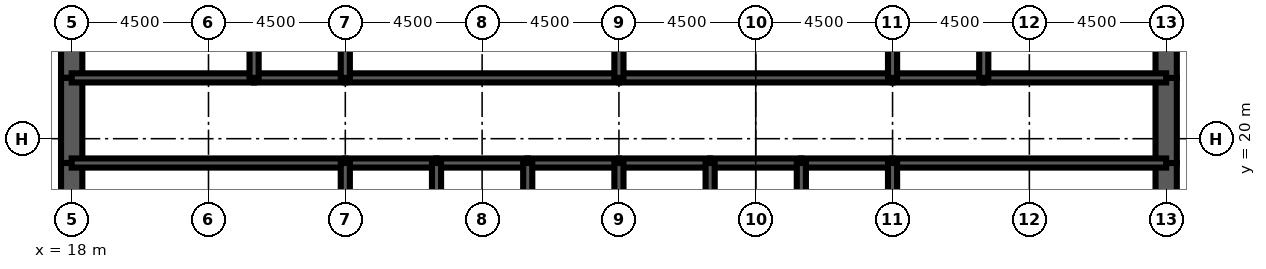
"""IFC4 building model, lengths in metres.
Left out: names, types, materials, properties, quantities, classifications, styles, units other than length and angle.
Written with IfcOpenShell. Run it as: python <this file> out.ifc"""

import sys

from ifc_helpers import new_model, si_unit, direction, frame, frame_2d, origin, place, context, subcontext, project, spatial, rectangle, extrude, element, fill, save


model = new_model("IFC4")
c1 = context("Model", 3, precision=1e-05, world=origin(), true_north=direction((0.0, 1.0)))
c2 = subcontext(c1, "Body", "Model", "MODEL_VIEW")
j1 = project(units=[si_unit("LENGTHUNIT", "METRE"), si_unit("PLANEANGLEUNIT", "RADIAN")], contexts=[c1])
p1 = place(None, origin())
s1 = spatial("IfcSite", under=j1, at=p1, CompositionType="ELEMENT")
p2 = place(p1, origin())
s2 = spatial("IfcBuilding", under=s1, at=p2, CompositionType="ELEMENT")
p3 = place(p2, frame((0.0, 0.0, 308.9)))
s3 = spatial("IfcBuildingStorey", under=s2, at=p3, CompositionType="ELEMENT", Elevation=308.9)
p4 = place(p3, frame((18.0, 26.0, 0.0), z_axis=(0.0, 0.0, 1.0), x_axis=(0.0, -1.0, 0.0)))
e1 = element("IfcWall", 1, at=p4, inside=s3, PredefinedType="SHEAR", context=c2, shape_type="SweptSolid", body=[
    extrude(rectangle(XDim=4.0, YDim=0.7, at=frame_2d((2.0, 0.0))), origin(), (0.0, 0.0, 1.0), 4.2),
])
p5 = place(p3, frame((18.0, 22.0, 0.0), z_axis=(0.0, 0.0, 1.0), x_axis=(0.0, -1.0, 0.0)))
e2 = element("IfcWall", 2, at=p5, inside=s3, PredefinedType="SHEAR", context=c2, shape_type="SweptSolid", body=[
    extrude(rectangle(XDim=2.8, YDim=0.7, at=frame_2d((1.4, 0.0))), origin(), (0.0, 0.0, 1.0), 4.2),
])
p6 = place(p5, frame((0.6, 0.0, 0.0)))
e3 = element("IfcOpeningElement", 3, at=p6, cuts=e2, PredefinedType="OPENING", context=c2, shape_type="SweptSolid", body=[
    extrude(rectangle(XDim=1.8, YDim=2.1, at=frame_2d((0.9, 1.05))), frame((0.0, 0.36, 0.0), z_axis=(0.0, -1.0, 0.0), x_axis=(1.0, 0.0, 0.0)), (0.0, 0.0, 1.0), 0.72),
])
for number, where, z_axis, x_axis in (
    (4, (18.0, 19.2, 0.0), (0.0, 0.0, 1.0), (0.0, -1.0, 0.0)),
    (5, (54.0, 16.0, 0.0), (0.0, 0.0, 1.0), (0.0, 1.0, 0.0)),
):
    element("IfcWall", number, at=place(p3, frame(where, z_axis=z_axis, x_axis=x_axis)), inside=s3, PredefinedType="SHEAR", context=c2, shape_type="SweptSolid", body=[
        extrude(rectangle(XDim=3.2, YDim=0.7, at=frame_2d((1.6, 0.0))), origin(), (0.0, 0.0, 1.0), 4.2),
    ])
p7 = place(p3, frame((54.0, 19.2, 0.0), z_axis=(0.0, 0.0, 1.0), x_axis=(0.0, 1.0, 0.0)))
e6 = element("IfcWall", 6, at=p7, inside=s3, PredefinedType="SHEAR", context=c2, shape_type="SweptSolid", body=[
    extrude(rectangle(XDim=2.8, YDim=0.7, at=frame_2d((1.4, 0.0))), origin(), (0.0, 0.0, 1.0), 4.2),
])
p8 = place(p7, frame((0.4, 0.0, 0.0)))
e7 = element("IfcOpeningElement", 7, at=p8, cuts=e6, PredefinedType="OPENING", context=c2, shape_type="SweptSolid", body=[
    extrude(rectangle(XDim=1.8, YDim=2.1, at=frame_2d((0.9, 1.05))), frame((0.0, 0.36, 0.0), z_axis=(0.0, -1.0, 0.0), x_axis=(1.0, 0.0, 0.0)), (0.0, 0.0, 1.0), 0.72),
])
p9 = place(p3, frame((54.0, 22.0, 0.0), z_axis=(0.0, 0.0, 1.0), x_axis=(0.0, 1.0, 0.0)))
e8 = element("IfcWall", 8, at=p9, inside=s3, PredefinedType="SHEAR", context=c2, shape_type="SweptSolid", body=[
    extrude(rectangle(XDim=4.0, YDim=0.7, at=frame_2d((2.0, 0.0))), origin(), (0.0, 0.0, 1.0), 4.2),
])
p10 = place(p3, frame((18.0, 19.2, 0.0), z_axis=(0.0, 0.0, 1.0), x_axis=(1.0, 0.0, 0.0)))
e9 = element("IfcWall", 9, at=p10, inside=s3, PredefinedType="SOLIDWALL", context=c2, shape_type="SweptSolid", body=[
    extrude(rectangle(XDim=9.0, YDim=0.3, at=frame_2d((4.5, 0.0))), origin(), (0.0, 0.0, 1.0), 4.2),
])
p11 = place(p10, frame((0.65, 0.0, 0.0)))
e10 = element("IfcOpeningElement", 10, at=p11, cuts=e9, PredefinedType="OPENING", context=c2, shape_type="SweptSolid", body=[
    extrude(rectangle(XDim=1.0, YDim=2.1, at=frame_2d((0.5, 1.05))), frame((0.0, 0.16, 0.0), z_axis=(0.0, -1.0, 0.0), x_axis=(1.0, 0.0, 0.0)), (0.0, 0.0, 1.0), 0.32),
])
p12 = place(p3, frame((27.0, 19.2, 0.0), z_axis=(0.0, 0.0, 1.0), x_axis=(1.0, 0.0, 0.0)))
e11 = element("IfcWall", 11, at=p12, inside=s3, PredefinedType="SOLIDWALL", context=c2, shape_type="SweptSolid", body=[
    extrude(rectangle(XDim=3.0, YDim=0.3, at=frame_2d((1.5, 0.0))), origin(), (0.0, 0.0, 1.0), 4.2),
])
p13 = place(p12, frame((0.95, 0.0, 0.0)))
e12 = element("IfcOpeningElement", 12, at=p13, cuts=e11, PredefinedType="OPENING", context=c2, shape_type="SweptSolid", body=[
    extrude(rectangle(XDim=1.1, YDim=2.2, at=frame_2d((0.55, 1.1))), frame((0.0, 0.16, 0.0), z_axis=(0.0, -1.0, 0.0), x_axis=(1.0, 0.0, 0.0)), (0.0, 0.0, 1.0), 0.32),
])
p14 = place(p3, frame((30.0, 19.2, 0.0), z_axis=(0.0, 0.0, 1.0), x_axis=(1.0, 0.0, 0.0)))
e13 = element("IfcWall", 13, at=p14, inside=s3, PredefinedType="SOLIDWALL", context=c2, shape_type="SweptSolid", body=[
    extrude(rectangle(XDim=3.0, YDim=0.3, at=frame_2d((1.5, 0.0))), origin(), (0.0, 0.0, 1.0), 4.2),
])
p15 = place(p14, frame((0.95, 0.0, 0.0)))
e14 = element("IfcOpeningElement", 14, at=p15, cuts=e13, PredefinedType="OPENING", context=c2, shape_type="SweptSolid", body=[
    extrude(rectangle(XDim=1.1, YDim=2.2, at=frame_2d((0.55, 1.1))), frame((0.0, 0.16, 0.0), z_axis=(0.0, -1.0, 0.0), x_axis=(1.0, 0.0, 0.0)), (0.0, 0.0, 1.0), 0.32),
])
p16 = place(p3, frame((33.0, 19.2, 0.0), z_axis=(0.0, 0.0, 1.0), x_axis=(1.0, 0.0, 0.0)))
e15 = element("IfcWall", 15, at=p16, inside=s3, PredefinedType="SOLIDWALL", context=c2, shape_type="SweptSolid", body=[
    extrude(rectangle(XDim=3.0, YDim=0.3, at=frame_2d((1.5, 0.0))), origin(), (0.0, 0.0, 1.0), 4.2),
])
p17 = place(p16, frame((0.95, 0.0, 0.0)))
e16 = element("IfcOpeningElement", 16, at=p17, cuts=e15, PredefinedType="OPENING", context=c2, shape_type="SweptSolid", body=[
    extrude(rectangle(XDim=1.1, YDim=2.2, at=frame_2d((0.55, 1.1))), frame((0.0, 0.16, 0.0), z_axis=(0.0, -1.0, 0.0), x_axis=(1.0, 0.0, 0.0)), (0.0, 0.0, 1.0), 0.32),
])
p18 = place(p3, frame((36.0, 19.2, 0.0), z_axis=(0.0, 0.0, 1.0), x_axis=(1.0, 0.0, 0.0)))
e17 = element("IfcWall", 17, at=p18, inside=s3, PredefinedType="SOLIDWALL", context=c2, shape_type="SweptSolid", body=[
    extrude(rectangle(XDim=3.0, YDim=0.3, at=frame_2d((1.5, 0.0))), origin(), (0.0, 0.0, 1.0), 4.2),
])
p19 = place(p18, frame((0.95, 0.0, 0.0)))
e18 = element("IfcOpeningElement", 18, at=p19, cuts=e17, PredefinedType="OPENING", context=c2, shape_type="SweptSolid", body=[
    extrude(rectangle(XDim=1.1, YDim=2.2, at=frame_2d((0.55, 1.1))), frame((0.0, 0.16, 0.0), z_axis=(0.0, -1.0, 0.0), x_axis=(1.0, 0.0, 0.0)), (0.0, 0.0, 1.0), 0.32),
])
p20 = place(p3, frame((39.0, 19.2, 0.0), z_axis=(0.0, 0.0, 1.0), x_axis=(1.0, 0.0, 0.0)))
e19 = element("IfcWall", 19, at=p20, inside=s3, PredefinedType="SOLIDWALL", context=c2, shape_type="SweptSolid", body=[
    extrude(rectangle(XDim=3.0, YDim=0.3, at=frame_2d((1.5, 0.0))), origin(), (0.0, 0.0, 1.0), 4.2),
])
p21 = place(p20, frame((1.0, 0.0, 0.0)))
e20 = element("IfcOpeningElement", 20, at=p21, cuts=e19, PredefinedType="OPENING", context=c2, shape_type="SweptSolid", body=[
    extrude(rectangle(XDim=1.0, YDim=2.1, at=frame_2d((0.5, 1.05))), frame((0.0, 0.16, 0.0), z_axis=(0.0, -1.0, 0.0), x_axis=(1.0, 0.0, 0.0)), (0.0, 0.0, 1.0), 0.32),
])
p22 = place(p3, frame((42.0, 19.2, 0.0), z_axis=(0.0, 0.0, 1.0), x_axis=(1.0, 0.0, 0.0)))
e21 = element("IfcWall", 21, at=p22, inside=s3, PredefinedType="SOLIDWALL", context=c2, shape_type="SweptSolid", body=[
    extrude(rectangle(XDim=3.0, YDim=0.3, at=frame_2d((1.5, 0.0))), origin(), (0.0, 0.0, 1.0), 4.2),
])
p23 = place(p22, frame((1.0, 0.0, 0.0)))
e22 = element("IfcOpeningElement", 22, at=p23, cuts=e21, PredefinedType="OPENING", context=c2, shape_type="SweptSolid", body=[
    extrude(rectangle(XDim=1.0, YDim=2.1, at=frame_2d((0.5, 1.05))), frame((0.0, 0.16, 0.0), z_axis=(0.0, -1.0, 0.0), x_axis=(1.0, 0.0, 0.0)), (0.0, 0.0, 1.0), 0.32),
])
p24 = place(p3, frame((45.0, 19.2, 0.0), z_axis=(0.0, 0.0, 1.0), x_axis=(1.0, 0.0, 0.0)))
e23 = element("IfcWall", 23, at=p24, inside=s3, PredefinedType="SOLIDWALL", context=c2, shape_type="SweptSolid", body=[
    extrude(rectangle(XDim=9.0, YDim=0.3, at=frame_2d((4.5, 0.0))), origin(), (0.0, 0.0, 1.0), 4.2),
])
p25 = place(p24, frame((7.35, 0.0, 0.0)))
e24 = element("IfcOpeningElement", 24, at=p25, cuts=e23, PredefinedType="OPENING", context=c2, shape_type="SweptSolid", body=[
    extrude(rectangle(XDim=1.0, YDim=2.1, at=frame_2d((0.5, 1.05))), frame((0.0, 0.16, 0.0), z_axis=(0.0, -1.0, 0.0), x_axis=(1.0, 0.0, 0.0)), (0.0, 0.0, 1.0), 0.32),
])
p26 = place(p3, frame((18.0, 22.0, 0.0), z_axis=(0.0, 0.0, 1.0), x_axis=(1.0, 0.0, 0.0)))
e25 = element("IfcWall", 25, at=p26, inside=s3, PredefinedType="SOLIDWALL", context=c2, shape_type="SweptSolid", body=[
    extrude(rectangle(XDim=6.0, YDim=0.3, at=frame_2d((3.0, 0.0))), origin(), (0.0, 0.0, 1.0), 4.2),
])
p27 = place(p26, frame((4.4, 0.0, 0.0)))
e26 = element("IfcOpeningElement", 26, at=p27, cuts=e25, PredefinedType="OPENING", context=c2, shape_type="SweptSolid", body=[
    extrude(rectangle(XDim=1.0, YDim=2.1, at=frame_2d((0.5, 1.05))), frame((0.0, 0.16, 0.0), z_axis=(0.0, -1.0, 0.0), x_axis=(1.0, 0.0, 0.0)), (0.0, 0.0, 1.0), 0.32),
])
p28 = place(p26, frame((0.6, 0.0, 0.0)))
e27 = element("IfcOpeningElement", 27, at=p28, cuts=e25, PredefinedType="OPENING", context=c2, shape_type="SweptSolid", body=[
    extrude(rectangle(XDim=1.0, YDim=2.1, at=frame_2d((0.5, 1.05))), frame((0.0, 0.16, 0.0), z_axis=(0.0, -1.0, 0.0), x_axis=(1.0, 0.0, 0.0)), (0.0, 0.0, 1.0), 0.32),
])
p29 = place(p3, frame((24.0, 22.0, 0.0), z_axis=(0.0, 0.0, 1.0), x_axis=(1.0, 0.0, 0.0)))
e28 = element("IfcWall", 28, at=p29, inside=s3, PredefinedType="SOLIDWALL", context=c2, shape_type="SweptSolid", body=[
    extrude(rectangle(XDim=3.0, YDim=0.3, at=frame_2d((1.5, 0.0))), origin(), (0.0, 0.0, 1.0), 4.2),
])
p30 = place(p29, frame((1.0, 0.0, 0.0)))
e29 = element("IfcOpeningElement", 29, at=p30, cuts=e28, PredefinedType="OPENING", context=c2, shape_type="SweptSolid", body=[
    extrude(rectangle(XDim=1.0, YDim=2.1, at=frame_2d((0.5, 1.05))), frame((0.0, 0.16, 0.0), z_axis=(0.0, -1.0, 0.0), x_axis=(1.0, 0.0, 0.0)), (0.0, 0.0, 1.0), 0.32),
])
p31 = place(p3, frame((27.0, 22.0, 0.0), z_axis=(0.0, 0.0, 1.0), x_axis=(1.0, 0.0, 0.0)))
e30 = element("IfcWall", 30, at=p31, inside=s3, PredefinedType="SOLIDWALL", context=c2, shape_type="SweptSolid", body=[
    extrude(rectangle(XDim=9.0, YDim=0.3, at=frame_2d((4.5, 0.0))), origin(), (0.0, 0.0, 1.0), 4.2),
])
p32 = place(p31, frame((4.0, 0.0, 0.0)))
e31 = element("IfcOpeningElement", 31, at=p32, cuts=e30, PredefinedType="OPENING", context=c2, shape_type="SweptSolid", body=[
    extrude(rectangle(XDim=1.0, YDim=2.1, at=frame_2d((0.5, 1.05))), frame((0.0, 0.16, 0.0), z_axis=(0.0, -1.0, 0.0), x_axis=(1.0, 0.0, 0.0)), (0.0, 0.0, 1.0), 0.32),
])
p33 = place(p3, frame((36.0, 22.0, 0.0), z_axis=(0.0, 0.0, 1.0), x_axis=(1.0, 0.0, 0.0)))
e32 = element("IfcWall", 32, at=p33, inside=s3, PredefinedType="SOLIDWALL", context=c2, shape_type="SweptSolid", body=[
    extrude(rectangle(XDim=9.0, YDim=0.3, at=frame_2d((4.5, 0.0))), origin(), (0.0, 0.0, 1.0), 4.2),
])
p34 = place(p33, frame((4.0, 0.0, 0.0)))
e33 = element("IfcOpeningElement", 33, at=p34, cuts=e32, PredefinedType="OPENING", context=c2, shape_type="SweptSolid", body=[
    extrude(rectangle(XDim=1.0, YDim=2.1, at=frame_2d((0.5, 1.05))), frame((0.0, 0.16, 0.0), z_axis=(0.0, -1.0, 0.0), x_axis=(1.0, 0.0, 0.0)), (0.0, 0.0, 1.0), 0.32),
])
p35 = place(p3, frame((45.0, 22.0, 0.0), z_axis=(0.0, 0.0, 1.0), x_axis=(1.0, 0.0, 0.0)))
e34 = element("IfcWall", 34, at=p35, inside=s3, PredefinedType="SOLIDWALL", context=c2, shape_type="SweptSolid", body=[
    extrude(rectangle(XDim=3.0, YDim=0.3, at=frame_2d((1.5, 0.0))), origin(), (0.0, 0.0, 1.0), 4.2),
])
p36 = place(p35, frame((1.0, 0.0, 0.0)))
e35 = element("IfcOpeningElement", 35, at=p36, cuts=e34, PredefinedType="OPENING", context=c2, shape_type="SweptSolid", body=[
    extrude(rectangle(XDim=1.0, YDim=2.1, at=frame_2d((0.5, 1.05))), frame((0.0, 0.16, 0.0), z_axis=(0.0, -1.0, 0.0), x_axis=(1.0, 0.0, 0.0)), (0.0, 0.0, 1.0), 0.32),
])
p37 = place(p3, frame((48.0, 22.0, 0.0), z_axis=(0.0, 0.0, 1.0), x_axis=(1.0, 0.0, 0.0)))
e36 = element("IfcWall", 36, at=p37, inside=s3, PredefinedType="SOLIDWALL", context=c2, shape_type="SweptSolid", body=[
    extrude(rectangle(XDim=6.0, YDim=0.3, at=frame_2d((3.0, 0.0))), origin(), (0.0, 0.0, 1.0), 4.2),
])
p38 = place(p37, frame((2.0, 0.0, 0.0)))
e37 = element("IfcOpeningElement", 37, at=p38, cuts=e36, PredefinedType="OPENING", context=c2, shape_type="SweptSolid", body=[
    extrude(rectangle(XDim=1.0, YDim=2.1, at=frame_2d((0.5, 1.05))), frame((0.0, 0.16, 0.0), z_axis=(0.0, -1.0, 0.0), x_axis=(1.0, 0.0, 0.0)), (0.0, 0.0, 1.0), 0.32),
])
for number, where, z_axis, x_axis in (
    (38, (27.0, 16.0, 0.0), (0.0, 0.0, 1.0), (0.0, 1.0, 0.0)),
    (39, (30.0, 16.0, 0.0), (0.0, 0.0, 1.0), (0.0, 1.0, 0.0)),
    (40, (33.0, 16.0, 0.0), (0.0, 0.0, 1.0), (0.0, 1.0, 0.0)),
    (41, (36.0, 16.0, 0.0), (0.0, 0.0, 1.0), (0.0, 1.0, 0.0)),
    (42, (39.0, 16.0, 0.0), (0.0, 0.0, 1.0), (0.0, 1.0, 0.0)),
    (43, (42.0, 16.0, 0.0), (0.0, 0.0, 1.0), (0.0, 1.0, 0.0)),
    (44, (45.0, 16.0, 0.0), (0.0, 0.0, 1.0), (0.0, 1.0, 0.0)),
):
    element("IfcWall", number, at=place(p3, frame(where, z_axis=z_axis, x_axis=x_axis)), inside=s3, PredefinedType="SOLIDWALL", context=c2, shape_type="SweptSolid", body=[
        extrude(rectangle(XDim=3.2, YDim=0.3, at=frame_2d((1.6, 0.0))), origin(), (0.0, 0.0, 1.0), 4.2),
    ])
for number, where, z_axis, x_axis in (
    (45, (24.0, 22.0, 0.0), (0.0, 0.0, 1.0), (0.0, 1.0, 0.0)),
    (46, (27.0, 22.0, 0.0), (0.0, 0.0, 1.0), (0.0, 1.0, 0.0)),
    (47, (36.0, 22.0, 0.0), (0.0, 0.0, 1.0), (0.0, 1.0, 0.0)),
    (48, (45.0, 22.0, 0.0), (0.0, 0.0, 1.0), (0.0, 1.0, 0.0)),
    (49, (48.0, 22.0, 0.0), (0.0, 0.0, 1.0), (0.0, 1.0, 0.0)),
):
    element("IfcWall", number, at=place(p3, frame(where, z_axis=z_axis, x_axis=x_axis)), inside=s3, PredefinedType="SOLIDWALL", context=c2, shape_type="SweptSolid", body=[
        extrude(rectangle(XDim=4.0, YDim=0.3, at=frame_2d((2.0, 0.0))), origin(), (0.0, 0.0, 1.0), 4.2),
    ])
p39 = place(p3, frame((38.0, 22.15, 0.0), z_axis=(0.0, 0.0, 1.0), x_axis=(0.0, 1.0, 0.0)))
e50 = element("IfcWall", 50, at=p39, inside=s3, PredefinedType="PARTITIONING", context=c2, shape_type="SweptSolid", body=[
    extrude(rectangle(XDim=3.7, YDim=0.15, at=frame_2d((1.85, 0.0))), origin(), (0.0, 0.0, 1.0), 3.0),
])
p40 = place(p39, frame((2.2, 0.0, 0.0)))
e51 = element("IfcOpeningElement", 51, at=p40, cuts=e50, PredefinedType="OPENING", context=c2, shape_type="SweptSolid", body=[
    extrude(rectangle(XDim=1.0, YDim=2.1, at=frame_2d((0.5, 1.05))), frame((0.0, 0.085, 0.0), z_axis=(0.0, -1.0, 0.0), x_axis=(1.0, 0.0, 0.0)), (0.0, 0.0, 1.0), 0.17),
])
p41 = place(p3, frame((19.925, 22.15, 0.0), z_axis=(0.0, 0.0, 1.0), x_axis=(0.0, 1.0, 0.0)))
e52 = element("IfcWall", 52, at=p41, inside=s3, PredefinedType="PARTITIONING", context=c2, shape_type="SweptSolid", body=[
    extrude(rectangle(XDim=3.7, YDim=0.15, at=frame_2d((1.85, 0.0))), origin(), (0.0, 0.0, 1.0), 3.0),
])
p42 = place(p13, origin())
e53 = element("IfcDoor", 53, at=p42, inside=s3, OperationType="DOUBLE_DOOR_SLIDING", PredefinedType="USERDEFINED", context=c2, shape_type="SweptSolid", body=[
    extrude(rectangle(XDim=1.1, YDim=2.2, at=frame_2d((0.55, 1.1))), frame((0.0, 0.025, 0.0), z_axis=(0.0, -1.0, 0.0), x_axis=(1.0, 0.0, 0.0)), (0.0, 0.0, 1.0), 0.05),
])
fill(e12, e53)
p43 = place(p15, origin())
e54 = element("IfcDoor", 54, at=p43, inside=s3, OperationType="DOUBLE_DOOR_SLIDING", PredefinedType="USERDEFINED", context=c2, shape_type="SweptSolid", body=[
    extrude(rectangle(XDim=1.1, YDim=2.2, at=frame_2d((0.55, 1.1))), frame((0.0, 0.025, 0.0), z_axis=(0.0, -1.0, 0.0), x_axis=(1.0, 0.0, 0.0)), (0.0, 0.0, 1.0), 0.05),
])
fill(e14, e54)
p44 = place(p17, origin())
e55 = element("IfcDoor", 55, at=p44, inside=s3, OperationType="DOUBLE_DOOR_SLIDING", PredefinedType="USERDEFINED", context=c2, shape_type="SweptSolid", body=[
    extrude(rectangle(XDim=1.1, YDim=2.2, at=frame_2d((0.55, 1.1))), frame((0.0, 0.025, 0.0), z_axis=(0.0, -1.0, 0.0), x_axis=(1.0, 0.0, 0.0)), (0.0, 0.0, 1.0), 0.05),
])
fill(e16, e55)
p45 = place(p19, origin())
e56 = element("IfcDoor", 56, at=p45, inside=s3, OperationType="DOUBLE_DOOR_SLIDING", PredefinedType="USERDEFINED", context=c2, shape_type="SweptSolid", body=[
    extrude(rectangle(XDim=1.1, YDim=2.2, at=frame_2d((0.55, 1.1))), frame((0.0, 0.025, 0.0), z_axis=(0.0, -1.0, 0.0), x_axis=(1.0, 0.0, 0.0)), (0.0, 0.0, 1.0), 0.05),
])
fill(e18, e56)
p46 = place(p11, origin())
e57 = element("IfcDoor", 57, at=p46, inside=s3, OperationType="SINGLE_SWING_LEFT", PredefinedType="DOOR", context=c2, shape_type="SweptSolid", body=[
    extrude(rectangle(XDim=1.0, YDim=2.1, at=frame_2d((0.5, 1.05))), frame((0.0, 0.025, 0.0), z_axis=(0.0, -1.0, 0.0), x_axis=(1.0, 0.0, 0.0)), (0.0, 0.0, 1.0), 0.05),
])
fill(e10, e57)
p47 = place(p25, origin())
e58 = element("IfcDoor", 58, at=p47, inside=s3, OperationType="SINGLE_SWING_RIGHT", PredefinedType="DOOR", context=c2, shape_type="SweptSolid", body=[
    extrude(rectangle(XDim=1.0, YDim=2.1, at=frame_2d((0.5, 1.05))), frame((0.0, 0.025, 0.0), z_axis=(0.0, -1.0, 0.0), x_axis=(1.0, 0.0, 0.0)), (0.0, 0.0, 1.0), 0.05),
])
fill(e24, e58)
p48 = place(p6, origin())
e59 = element("IfcDoor", 59, at=p48, inside=s3, OperationType="SINGLE_SWING_LEFT", PredefinedType="DOOR", context=c2, shape_type="SweptSolid", body=[
    extrude(rectangle(XDim=1.8, YDim=2.1, at=frame_2d((0.9, 1.05))), frame((0.0, 0.35, 0.0), z_axis=(0.0, -1.0, 0.0), x_axis=(1.0, 0.0, 0.0)), (0.0, 0.0, 1.0), 0.699),
])
fill(e3, e59)
p49 = place(p8, origin())
e60 = element("IfcDoor", 60, at=p49, inside=s3, OperationType="SINGLE_SWING_LEFT", PredefinedType="DOOR", context=c2, shape_type="SweptSolid", body=[
    extrude(rectangle(XDim=1.8, YDim=2.1, at=frame_2d((0.9, 1.05))), frame((0.0, 0.35, 0.0), z_axis=(0.0, -1.0, 0.0), x_axis=(1.0, 0.0, 0.0)), (0.0, 0.0, 1.0), 0.699),
])
fill(e7, e60)
p50 = place(p27, origin())
e61 = element("IfcDoor", 61, at=p50, inside=s3, OperationType="SINGLE_SWING_RIGHT", PredefinedType="DOOR", context=c2, shape_type="SweptSolid", body=[
    extrude(rectangle(XDim=1.0, YDim=2.1, at=frame_2d((0.5, 1.05))), frame((0.0, 0.025, 0.0), z_axis=(0.0, -1.0, 0.0), x_axis=(1.0, 0.0, 0.0)), (0.0, 0.0, 1.0), 0.05),
])
fill(e26, e61)
p51 = place(p30, origin())
e62 = element("IfcDoor", 62, at=p51, inside=s3, OperationType="SINGLE_SWING_LEFT", PredefinedType="DOOR", context=c2, shape_type="SweptSolid", body=[
    extrude(rectangle(XDim=1.0, YDim=2.1, at=frame_2d((0.5, 1.05))), frame((0.0, 0.025, 0.0), z_axis=(0.0, -1.0, 0.0), x_axis=(1.0, 0.0, 0.0)), (0.0, 0.0, 1.0), 0.05),
])
fill(e29, e62)
p52 = place(p32, origin())
e63 = element("IfcDoor", 63, at=p52, inside=s3, OperationType="SINGLE_SWING_LEFT", PredefinedType="DOOR", context=c2, shape_type="SweptSolid", body=[
    extrude(rectangle(XDim=1.0, YDim=2.1, at=frame_2d((0.5, 1.05))), frame((0.0, 0.025, 0.0), z_axis=(0.0, -1.0, 0.0), x_axis=(1.0, 0.0, 0.0)), (0.0, 0.0, 1.0), 0.05),
])
fill(e31, e63)
p53 = place(p34, origin())
e64 = element("IfcDoor", 64, at=p53, inside=s3, OperationType="SINGLE_SWING_LEFT", PredefinedType="DOOR", context=c2, shape_type="SweptSolid", body=[
    extrude(rectangle(XDim=1.0, YDim=2.1, at=frame_2d((0.5, 1.05))), frame((0.0, 0.025, 0.0), z_axis=(0.0, -1.0, 0.0), x_axis=(1.0, 0.0, 0.0)), (0.0, 0.0, 1.0), 0.05),
])
fill(e33, e64)
p54 = place(p36, origin())
e65 = element("IfcDoor", 65, at=p54, inside=s3, OperationType="SINGLE_SWING_LEFT", PredefinedType="DOOR", context=c2, shape_type="SweptSolid", body=[
    extrude(rectangle(XDim=1.0, YDim=2.1, at=frame_2d((0.5, 1.05))), frame((0.0, 0.025, 0.0), z_axis=(0.0, -1.0, 0.0), x_axis=(1.0, 0.0, 0.0)), (0.0, 0.0, 1.0), 0.05),
])
fill(e35, e65)
p55 = place(p38, origin())
e66 = element("IfcDoor", 66, at=p55, inside=s3, OperationType="SINGLE_SWING_LEFT", PredefinedType="DOOR", context=c2, shape_type="SweptSolid", body=[
    extrude(rectangle(XDim=1.0, YDim=2.1, at=frame_2d((0.5, 1.05))), frame((0.0, 0.025, 0.0), z_axis=(0.0, -1.0, 0.0), x_axis=(1.0, 0.0, 0.0)), (0.0, 0.0, 1.0), 0.05),
])
fill(e37, e66)
p56 = place(p28, origin())
e67 = element("IfcDoor", 67, at=p56, inside=s3, OperationType="SINGLE_SWING_LEFT", PredefinedType="DOOR", context=c2, shape_type="SweptSolid", body=[
    extrude(rectangle(XDim=1.0, YDim=2.1, at=frame_2d((0.5, 1.05))), frame((0.0, 0.025, 0.0), z_axis=(0.0, -1.0, 0.0), x_axis=(1.0, 0.0, 0.0)), (0.0, 0.0, 1.0), 0.05),
])
fill(e27, e67)
p57 = place(p21, origin())
e68 = element("IfcDoor", 68, at=p57, inside=s3, OperationType="SINGLE_SWING_LEFT", PredefinedType="DOOR", context=c2, shape_type="SweptSolid", body=[
    extrude(rectangle(XDim=1.0, YDim=2.1, at=frame_2d((0.5, 1.05))), frame((0.0, 0.025, 0.0), z_axis=(0.0, -1.0, 0.0), x_axis=(1.0, 0.0, 0.0)), (0.0, 0.0, 1.0), 0.05),
])
fill(e20, e68)
p58 = place(p23, origin())
e69 = element("IfcDoor", 69, at=p58, inside=s3, OperationType="SINGLE_SWING_LEFT", PredefinedType="DOOR", context=c2, shape_type="SweptSolid", body=[
    extrude(rectangle(XDim=1.0, YDim=2.1, at=frame_2d((0.5, 1.05))), frame((0.0, 0.025, 0.0), z_axis=(0.0, -1.0, 0.0), x_axis=(1.0, 0.0, 0.0)), (0.0, 0.0, 1.0), 0.05),
])
fill(e22, e69)
save(model, sys.argv[1])
